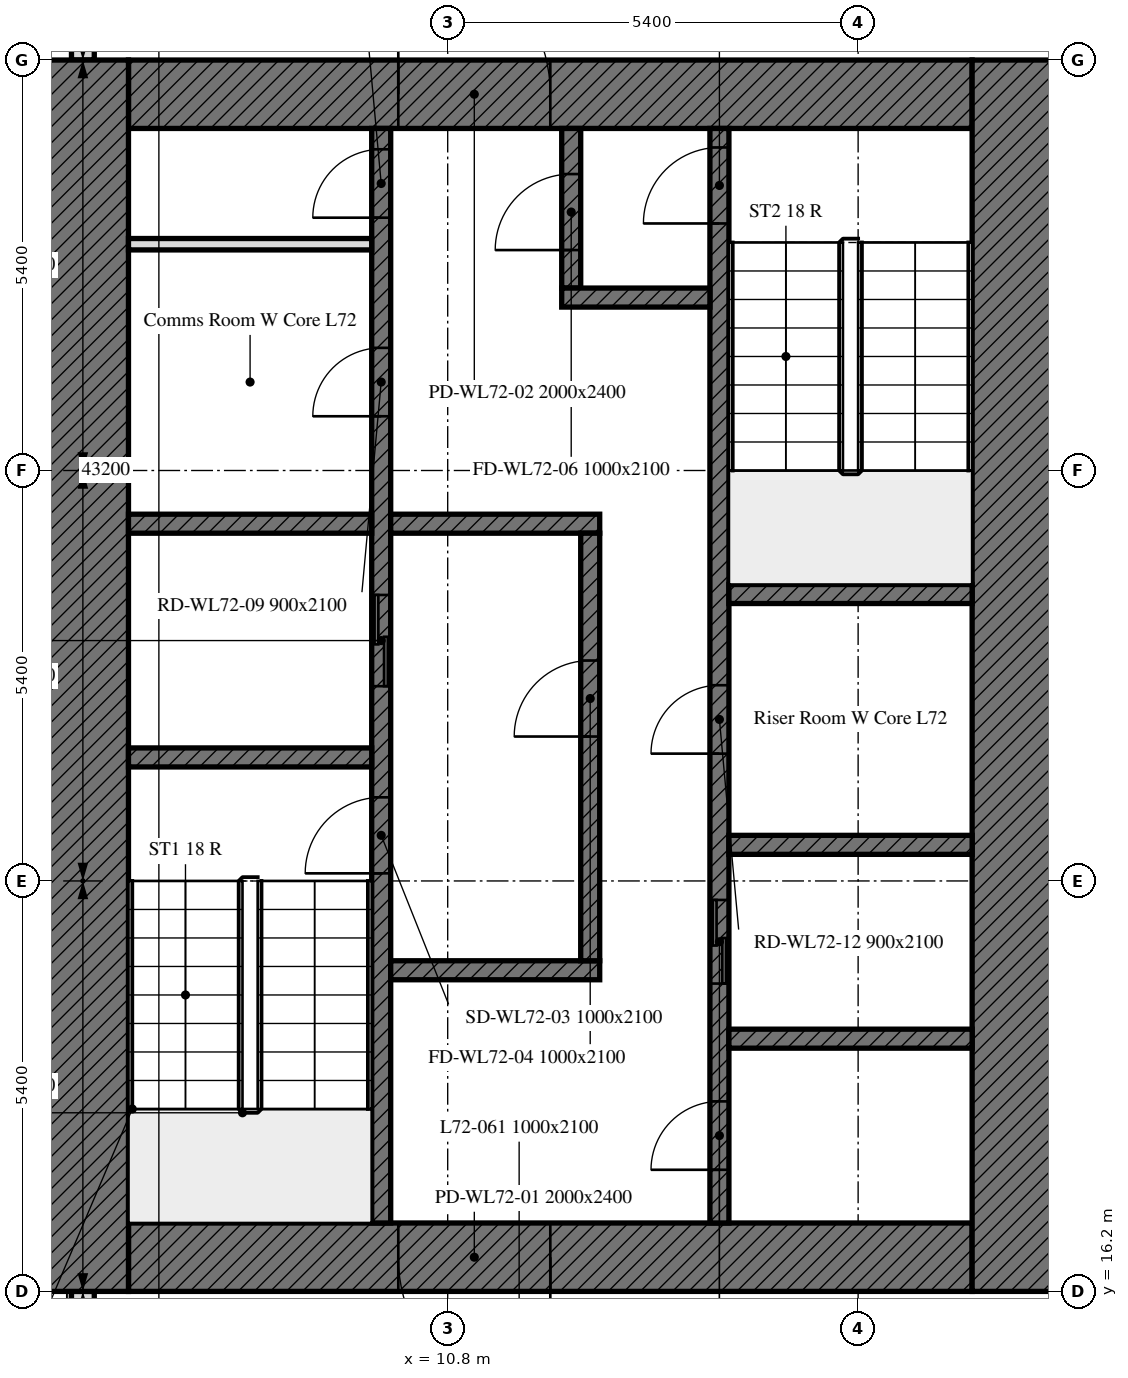
"""IFC4 building model, lengths in metres.
Left out: names, types, materials, properties, quantities, classifications, styles, units other than length and angle.
Written with IfcOpenShell. Run it as: python <this file> out.ifc"""

import sys

from ifc_helpers import new_model, si_unit, direction, frame, frame_2d, origin, place, context, subcontext, project, spatial, rectangle, extrude, element, fill, save


model = new_model("IFC4")
c1 = context("Model", 3, precision=1e-05, world=origin(), true_north=direction((0.0, 1.0)))
c2 = subcontext(c1, "Body", "Model", "MODEL_VIEW")
j1 = project(units=[si_unit("LENGTHUNIT", "METRE"), si_unit("PLANEANGLEUNIT", "RADIAN")], contexts=[c1])
p1 = place(None, origin())
s1 = spatial("IfcSite", under=j1, at=p1, CompositionType="ELEMENT")
p2 = place(p1, origin())
s2 = spatial("IfcBuilding", under=s1, at=p2, CompositionType="ELEMENT")
p3 = place(p2, frame((0.0, 0.0, 291.7)))
s3 = spatial("IfcBuildingStorey", under=s2, at=p3, CompositionType="ELEMENT", Elevation=291.7)
p4 = place(p3, frame((6.0, 43.014, 0.0), z_axis=(0.0, 0.0, 1.0), x_axis=(0.0, -1.0, 0.0)))
e1 = element("IfcWall", 1, at=p4, inside=s3, PredefinedType="SOLIDWALL", context=c2, shape_type="SweptSolid", body=[
    extrude(rectangle(XDim=10.614, YDim=0.3, at=frame_2d((5.307, 0.0))), origin(), (0.0, 0.0, 1.0), 3.0),
])
p5 = place(p4, frame((1.789, 0.0, 0.9)))
e2 = element("IfcOpeningElement", 2, at=p5, cuts=e1, PredefinedType="OPENING", context=c2, shape_type="SweptSolid", body=[
    extrude(rectangle(XDim=0.65, YDim=1.7, at=frame_2d((0.325, 0.85))), frame((0.0, 0.16, 0.0), z_axis=(0.0, -1.0, 0.0), x_axis=(1.0, 0.0, 0.0)), (0.0, 0.0, 1.0), 0.32),
])
p6 = place(p4, frame((2.764, 0.0, 0.9)))
e3 = element("IfcOpeningElement", 3, at=p6, cuts=e1, PredefinedType="OPENING", context=c2, shape_type="SweptSolid", body=[
    extrude(rectangle(XDim=1.1, YDim=1.7, at=frame_2d((0.55, 0.85))), frame((0.0, 0.16, 0.0), z_axis=(0.0, -1.0, 0.0), x_axis=(1.0, 0.0, 0.0)), (0.0, 0.0, 1.0), 0.32),
])
p7 = place(p4, frame((6.564, 0.0, 0.9)))
e4 = element("IfcOpeningElement", 4, at=p7, cuts=e1, PredefinedType="OPENING", context=c2, shape_type="SweptSolid", body=[
    extrude(rectangle(XDim=1.1, YDim=1.7, at=frame_2d((0.55, 0.85))), frame((0.0, 0.16, 0.0), z_axis=(0.0, -1.0, 0.0), x_axis=(1.0, 0.0, 0.0)), (0.0, 0.0, 1.0), 0.32),
])
p8 = place(p4, frame((8.539, 0.0, 0.9)))
e5 = element("IfcOpeningElement", 5, at=p8, cuts=e1, PredefinedType="OPENING", context=c2, shape_type="SweptSolid", body=[
    extrude(rectangle(XDim=0.65, YDim=1.7, at=frame_2d((0.325, 0.85))), frame((0.0, 0.16, 0.0), z_axis=(0.0, -1.0, 0.0), x_axis=(1.0, 0.0, 0.0)), (0.0, 0.0, 1.0), 0.32),
])
p9 = place(p3, frame((6.0, 16.2, 0.0), z_axis=(0.0, 0.0, 1.0), x_axis=(0.0, -1.0, 0.0)))
e6 = element("IfcWall", 6, at=p9, inside=s3, PredefinedType="SOLIDWALL", context=c2, shape_type="SweptSolid", body=[
    extrude(rectangle(XDim=5.214, YDim=0.3, at=frame_2d((2.607, 0.0))), origin(), (0.0, 0.0, 1.0), 3.0),
])
p10 = place(p9, frame((1.0, 0.0, 0.9)))
e7 = element("IfcOpeningElement", 7, at=p10, cuts=e6, PredefinedType="OPENING", context=c2, shape_type="SweptSolid", body=[
    extrude(rectangle(XDim=1.1, YDim=1.7, at=frame_2d((0.55, 0.85))), frame((0.0, 0.16, 0.0), z_axis=(0.0, -1.0, 0.0), x_axis=(1.0, 0.0, 0.0)), (0.0, 0.0, 1.0), 0.32),
])
p11 = place(p9, frame((2.95, 0.0, 0.9)))
e8 = element("IfcOpeningElement", 8, at=p11, cuts=e6, PredefinedType="OPENING", context=c2, shape_type="SweptSolid", body=[
    extrude(rectangle(XDim=1.1, YDim=1.7, at=frame_2d((0.55, 0.85))), frame((0.0, 0.16, 0.0), z_axis=(0.0, -1.0, 0.0), x_axis=(1.0, 0.0, 0.0)), (0.0, 0.0, 1.0), 0.32),
])
p12 = place(p3, frame((17.7, 16.65, 0.0), z_axis=(0.0, 0.0, 1.0), x_axis=(-1.0, 0.0, 0.0)))
e9 = element("IfcWall", 9, at=p12, inside=s3, PredefinedType="SOLIDWALL", context=c2, shape_type="SweptSolid", body=[
    extrude(rectangle(XDim=11.1, YDim=0.9, at=frame_2d((5.55, 0.0))), origin(), (0.0, 0.0, 1.0), 3.0),
])
p13 = place(p12, frame((5.55, 0.0, 0.0)))
e10 = element("IfcOpeningElement", 10, at=p13, cuts=e9, PredefinedType="OPENING", context=c2, shape_type="SweptSolid", body=[
    extrude(rectangle(XDim=2.0, YDim=2.4, at=frame_2d((1.0, 1.2))), frame((0.0, 0.45, 0.0), z_axis=(0.0, -1.0, 0.0), x_axis=(1.0, 0.0, 0.0)), (0.0, 0.0, 1.0), 0.9),
])
p14 = place(p3, frame((6.6, 31.95, 0.0), z_axis=(0.0, 0.0, 1.0), x_axis=(1.0, 0.0, 0.0)))
e11 = element("IfcWall", 11, at=p14, inside=s3, PredefinedType="SOLIDWALL", context=c2, shape_type="SweptSolid", body=[
    extrude(rectangle(XDim=11.1, YDim=0.9, at=frame_2d((5.55, 0.0))), origin(), (0.0, 0.0, 1.0), 3.0),
])
p15 = place(p14, frame((3.55, 0.0, 0.0)))
e12 = element("IfcOpeningElement", 12, at=p15, cuts=e11, PredefinedType="OPENING", context=c2, shape_type="SweptSolid", body=[
    extrude(rectangle(XDim=2.0, YDim=2.4, at=frame_2d((1.0, 1.2))), frame((0.0, 0.45, 0.0), z_axis=(0.0, -1.0, 0.0), x_axis=(1.0, 0.0, 0.0)), (0.0, 0.0, 1.0), 0.9),
])
for number, where, z_axis, x_axis in (
    (13, (6.0, 16.2, 0.0), (0.0, 0.0, 1.0), (0.0, 1.0, 0.0)),
    (14, (18.3, 32.4, 0.0), (0.0, 0.0, 1.0), (0.0, -1.0, 0.0)),
):
    element("IfcWall", number, at=place(p3, frame(where, z_axis=z_axis, x_axis=x_axis)), inside=s3, PredefinedType="SOLIDWALL", context=c2, shape_type="SweptSolid", body=[
        extrude(rectangle(XDim=16.2, YDim=1.2, at=frame_2d((8.1, 0.0))), origin(), (0.0, 0.0, 1.0), 3.0),
    ])
p16 = place(p3, frame((9.925, 17.1, 0.0), z_axis=(0.0, 0.0, 1.0), x_axis=(0.0, 1.0, 0.0)))
e15 = element("IfcWall", 15, at=p16, inside=s3, PredefinedType="SOLIDWALL", context=c2, shape_type="SweptSolid", body=[
    extrude(rectangle(XDim=14.4, YDim=0.25, at=frame_2d((7.2, 0.0))), origin(), (0.0, 0.0, 1.0), 3.0),
])
p17 = place(p16, frame((4.6, 0.0, 0.0)))
e16 = element("IfcOpeningElement", 16, at=p17, cuts=e15, PredefinedType="OPENING", context=c2, shape_type="SweptSolid", body=[
    extrude(rectangle(XDim=1.0, YDim=2.1, at=frame_2d((0.5, 1.05))), frame((0.0, 0.125, 0.0), z_axis=(0.0, -1.0, 0.0), x_axis=(1.0, 0.0, 0.0)), (0.0, 0.0, 1.0), 0.25),
])
p18 = place(p16, frame((7.062, 0.0, 0.0)))
e17 = element("IfcOpeningElement", 17, at=p18, cuts=e15, PredefinedType="OPENING", context=c2, shape_type="SweptSolid", body=[
    extrude(rectangle(XDim=1.2, YDim=2.1, at=frame_2d((0.6, 1.05))), frame((0.0, 0.125, 0.0), z_axis=(0.0, -1.0, 0.0), x_axis=(1.0, 0.0, 0.0)), (0.0, 0.0, 1.0), 0.25),
])
p19 = place(p16, frame((10.614, 0.0, 0.0)))
e18 = element("IfcOpeningElement", 18, at=p19, cuts=e15, PredefinedType="OPENING", context=c2, shape_type="SweptSolid", body=[
    extrude(rectangle(XDim=0.9, YDim=2.1, at=frame_2d((0.45, 1.05))), frame((0.0, 0.125, 0.0), z_axis=(0.0, -1.0, 0.0), x_axis=(1.0, 0.0, 0.0)), (0.0, 0.0, 1.0), 0.25),
])
p20 = place(p16, frame((13.226, 0.0, 0.0)))
e19 = element("IfcOpeningElement", 19, at=p20, cuts=e15, PredefinedType="OPENING", context=c2, shape_type="SweptSolid", body=[
    extrude(rectangle(XDim=0.9, YDim=2.1, at=frame_2d((0.45, 1.05))), frame((0.0, 0.125, 0.0), z_axis=(0.0, -1.0, 0.0), x_axis=(1.0, 0.0, 0.0)), (0.0, 0.0, 1.0), 0.25),
])
p21 = place(p3, frame((14.375, 17.1, 0.0), z_axis=(0.0, 0.0, 1.0), x_axis=(0.0, 1.0, 0.0)))
e20 = element("IfcWall", 20, at=p21, inside=s3, PredefinedType="SOLIDWALL", context=c2, shape_type="SweptSolid", body=[
    extrude(rectangle(XDim=14.4, YDim=0.25, at=frame_2d((7.2, 0.0))), origin(), (0.0, 0.0, 1.0), 3.0),
])
p22 = place(p21, frame((13.15, 0.0, 0.0)))
e21 = element("IfcOpeningElement", 21, at=p22, cuts=e20, PredefinedType="OPENING", context=c2, shape_type="SweptSolid", body=[
    extrude(rectangle(XDim=1.0, YDim=2.1, at=frame_2d((0.5, 1.05))), frame((0.0, 0.125, 0.0), z_axis=(0.0, -1.0, 0.0), x_axis=(1.0, 0.0, 0.0)), (0.0, 0.0, 1.0), 0.25),
])
p23 = place(p21, frame((3.15, 0.0, 0.0)))
e22 = element("IfcOpeningElement", 22, at=p23, cuts=e20, PredefinedType="OPENING", context=c2, shape_type="SweptSolid", body=[
    extrude(rectangle(XDim=1.1, YDim=2.1, at=frame_2d((0.55, 1.05))), frame((0.0, 0.125, 0.0), z_axis=(0.0, -1.0, 0.0), x_axis=(1.0, 0.0, 0.0)), (0.0, 0.0, 1.0), 0.25),
])
p24 = place(p21, frame((0.7, 0.0, 0.0)))
e23 = element("IfcOpeningElement", 23, at=p24, cuts=e20, PredefinedType="OPENING", context=c2, shape_type="SweptSolid", body=[
    extrude(rectangle(XDim=0.9, YDim=2.1, at=frame_2d((0.45, 1.05))), frame((0.0, 0.125, 0.0), z_axis=(0.0, -1.0, 0.0), x_axis=(1.0, 0.0, 0.0)), (0.0, 0.0, 1.0), 0.25),
])
p25 = place(p21, frame((6.175, 0.0, 0.0)))
e24 = element("IfcOpeningElement", 24, at=p25, cuts=e20, PredefinedType="OPENING", context=c2, shape_type="SweptSolid", body=[
    extrude(rectangle(XDim=0.9, YDim=2.1, at=frame_2d((0.45, 1.05))), frame((0.0, 0.125, 0.0), z_axis=(0.0, -1.0, 0.0), x_axis=(1.0, 0.0, 0.0)), (0.0, 0.0, 1.0), 0.25),
])
for number, where, z_axis, x_axis in (
    (25, (6.6, 23.225, 0.0), (0.0, 0.0, 1.0), (1.0, 0.0, 0.0)),
    (26, (14.5, 25.375, 0.0), (0.0, 0.0, 1.0), (1.0, 0.0, 0.0)),
    (27, (14.5, 22.075, 0.0), (0.0, 0.0, 1.0), (1.0, 0.0, 0.0)),
    (28, (6.6, 26.3, 0.0), (0.0, 0.0, 1.0), (1.0, 0.0, 0.0)),
):
    element("IfcWall", number, at=place(p3, frame(where, z_axis=z_axis, x_axis=x_axis)), inside=s3, PredefinedType="SOLIDWALL", context=c2, shape_type="SweptSolid", body=[
        extrude(rectangle(XDim=3.2, YDim=0.25, at=frame_2d((1.6, 0.0))), origin(), (0.0, 0.0, 1.0), 3.0),
    ])
for number, where, z_axis, x_axis in (
    (29, (10.05, 26.3, 0.0), (0.0, 0.0, 1.0), (1.0, 0.0, 0.0)),
    (30, (10.05, 20.425, 0.0), (0.0, 0.0, 1.0), (1.0, 0.0, 0.0)),
):
    element("IfcWall", number, at=place(p3, frame(where, z_axis=z_axis, x_axis=x_axis)), inside=s3, PredefinedType="SOLIDWALL", context=c2, shape_type="SweptSolid", body=[
        extrude(rectangle(XDim=2.75, YDim=0.25, at=frame_2d((1.375, 0.0))), origin(), (0.0, 0.0, 1.0), 3.0),
    ])
p26 = place(p3, frame((12.425, 29.4, 0.0), z_axis=(0.0, 0.0, 1.0), x_axis=(0.0, 1.0, 0.0)))
e31 = element("IfcWall", 31, at=p26, inside=s3, PredefinedType="SOLIDWALL", context=c2, shape_type="SweptSolid", body=[
    extrude(rectangle(XDim=2.1, YDim=0.25, at=frame_2d((1.05, 0.0))), origin(), (0.0, 0.0, 1.0), 3.0),
])
p27 = place(p26, frame((0.5, 0.0, 0.0)))
e32 = element("IfcOpeningElement", 32, at=p27, cuts=e31, PredefinedType="OPENING", context=c2, shape_type="SweptSolid", body=[
    extrude(rectangle(XDim=1.0, YDim=2.1, at=frame_2d((0.5, 1.05))), frame((0.0, 0.125, 0.0), z_axis=(0.0, -1.0, 0.0), x_axis=(1.0, 0.0, 0.0)), (0.0, 0.0, 1.0), 0.25),
])
p28 = place(p3, frame((12.3, 29.275, 0.0), z_axis=(0.0, 0.0, 1.0), x_axis=(1.0, 0.0, 0.0)))
e33 = element("IfcWall", 33, at=p28, inside=s3, PredefinedType="SOLIDWALL", context=c2, shape_type="SweptSolid", body=[
    extrude(rectangle(XDim=1.95, YDim=0.25, at=frame_2d((0.975, 0.0))), origin(), (0.0, 0.0, 1.0), 3.0),
])
p29 = place(p3, frame((12.675, 20.55, 0.0), z_axis=(0.0, 0.0, 1.0), x_axis=(0.0, 1.0, 0.0)))
e34 = element("IfcWall", 34, at=p29, inside=s3, PredefinedType="SOLIDWALL", context=c2, shape_type="SweptSolid", body=[
    extrude(rectangle(XDim=5.625, YDim=0.25, at=frame_2d((2.812, 0.0))), origin(), (0.0, 0.0, 1.0), 3.0),
])
p30 = place(p29, frame((2.95, 0.0, 0.0)))
e35 = element("IfcOpeningElement", 35, at=p30, cuts=e34, PredefinedType="OPENING", context=c2, shape_type="SweptSolid", body=[
    extrude(rectangle(XDim=1.0, YDim=2.1, at=frame_2d((0.5, 1.05))), frame((0.0, 0.125, 0.0), z_axis=(0.0, -1.0, 0.0), x_axis=(1.0, 0.0, 0.0)), (0.0, 0.0, 1.0), 0.25),
])
p31 = place(p3, frame((14.5, 19.525, 0.0), z_axis=(0.0, 0.0, 1.0), x_axis=(1.0, 0.0, 0.0)))
e36 = element("IfcWall", 36, at=p31, inside=s3, PredefinedType="SOLIDWALL", context=c2, shape_type="SweptSolid", body=[
    extrude(rectangle(XDim=3.2, YDim=0.25, at=frame_2d((1.6, 0.0))), origin(), (0.0, 0.0, 1.0), 3.0),
])
p32 = place(p3, frame((6.6, 29.977, 0.0), z_axis=(0.0, 0.0, 1.0), x_axis=(1.0, 0.0, 0.0)))
e37 = element("IfcWall", 37, at=p32, inside=s3, PredefinedType="PARTITIONING", context=c2, shape_type="SweptSolid", body=[
    extrude(rectangle(XDim=3.2, YDim=0.15, at=frame_2d((1.6, 0.0))), origin(), (0.0, 0.0, 1.0), 3.0),
])
p33 = place(p13, origin())
e38 = element("IfcDoor", 38, at=p33, inside=s3, OperationType="DOUBLE_DOOR_SINGLE_SWING", PredefinedType="DOOR", context=c2, shape_type="SweptSolid", body=[
    extrude(rectangle(XDim=2.0, YDim=2.4, at=frame_2d((1.0, 1.2))), frame((0.0, 0.025, 0.0), z_axis=(0.0, -1.0, 0.0), x_axis=(1.0, 0.0, 0.0)), (0.0, 0.0, 1.0), 0.05),
])
fill(e10, e38)
p34 = place(p15, origin())
e39 = element("IfcDoor", 39, at=p34, inside=s3, OperationType="DOUBLE_DOOR_SINGLE_SWING", PredefinedType="DOOR", context=c2, shape_type="SweptSolid", body=[
    extrude(rectangle(XDim=2.0, YDim=2.4, at=frame_2d((1.0, 1.2))), frame((0.0, 0.025, 0.0), z_axis=(0.0, -1.0, 0.0), x_axis=(1.0, 0.0, 0.0)), (0.0, 0.0, 1.0), 0.05),
])
fill(e12, e39)
p35 = place(p17, origin())
e40 = element("IfcDoor", 40, at=p35, inside=s3, OperationType="SINGLE_SWING_LEFT", PredefinedType="DOOR", context=c2, shape_type="SweptSolid", body=[
    extrude(rectangle(XDim=1.0, YDim=2.1, at=frame_2d((0.5, 1.05))), frame((0.0, 0.025, 0.0), z_axis=(0.0, -1.0, 0.0), x_axis=(1.0, 0.0, 0.0)), (0.0, 0.0, 1.0), 0.05),
])
fill(e16, e40)
p36 = place(p30, origin())
e41 = element("IfcDoor", 41, at=p36, inside=s3, OperationType="SINGLE_SWING_LEFT", PredefinedType="DOOR", context=c2, shape_type="SweptSolid", body=[
    extrude(rectangle(XDim=1.0, YDim=2.1, at=frame_2d((0.5, 1.05))), frame((0.0, 0.025, 0.0), z_axis=(0.0, -1.0, 0.0), x_axis=(1.0, 0.0, 0.0)), (0.0, 0.0, 1.0), 0.05),
])
fill(e35, e41)
p37 = place(p22, origin())
e42 = element("IfcDoor", 42, at=p37, inside=s3, OperationType="SINGLE_SWING_LEFT", PredefinedType="DOOR", context=c2, shape_type="SweptSolid", body=[
    extrude(rectangle(XDim=1.0, YDim=2.1, at=frame_2d((0.5, 1.05))), frame((0.0, 0.025, 0.0), z_axis=(0.0, -1.0, 0.0), x_axis=(1.0, 0.0, 0.0)), (0.0, 0.0, 1.0), 0.05),
])
fill(e21, e42)
p38 = place(p27, origin())
e43 = element("IfcDoor", 43, at=p38, inside=s3, OperationType="SINGLE_SWING_LEFT", PredefinedType="DOOR", context=c2, shape_type="SweptSolid", body=[
    extrude(rectangle(XDim=1.0, YDim=2.1, at=frame_2d((0.5, 1.05))), frame((0.0, 0.025, 0.0), z_axis=(0.0, -1.0, 0.0), x_axis=(1.0, 0.0, 0.0)), (0.0, 0.0, 1.0), 0.05),
])
fill(e32, e43)
p39 = place(p18, origin())
e44 = element("IfcDoor", 44, at=p39, inside=s3, OperationType="DOUBLE_DOOR_SLIDING", PredefinedType="DOOR", context=c2, shape_type="SweptSolid", body=[
    extrude(rectangle(XDim=1.2, YDim=2.1, at=frame_2d((0.6, 1.05))), frame((0.0, 0.025, 0.0), z_axis=(0.0, -1.0, 0.0), x_axis=(1.0, 0.0, 0.0)), (0.0, 0.0, 1.0), 0.05),
])
fill(e17, e44)
p40 = place(p23, origin())
e45 = element("IfcDoor", 45, at=p40, inside=s3, OperationType="DOUBLE_DOOR_SLIDING", PredefinedType="DOOR", context=c2, shape_type="SweptSolid", body=[
    extrude(rectangle(XDim=1.1, YDim=2.1, at=frame_2d((0.55, 1.05))), frame((0.0, 0.025, 0.0), z_axis=(0.0, -1.0, 0.0), x_axis=(1.0, 0.0, 0.0)), (0.0, 0.0, 1.0), 0.05),
])
fill(e22, e45)
p41 = place(p19, origin())
e46 = element("IfcDoor", 46, at=p41, inside=s3, OperationType="SINGLE_SWING_LEFT", PredefinedType="DOOR", context=c2, shape_type="SweptSolid", body=[
    extrude(rectangle(XDim=0.9, YDim=2.1, at=frame_2d((0.45, 1.05))), frame((0.0, 0.025, 0.0), z_axis=(0.0, -1.0, 0.0), x_axis=(1.0, 0.0, 0.0)), (0.0, 0.0, 1.0), 0.05),
])
fill(e18, e46)
p42 = place(p20, origin())
e47 = element("IfcDoor", 47, at=p42, inside=s3, OperationType="SINGLE_SWING_LEFT", PredefinedType="DOOR", context=c2, shape_type="SweptSolid", body=[
    extrude(rectangle(XDim=0.9, YDim=2.1, at=frame_2d((0.45, 1.05))), frame((0.0, 0.025, 0.0), z_axis=(0.0, -1.0, 0.0), x_axis=(1.0, 0.0, 0.0)), (0.0, 0.0, 1.0), 0.05),
])
fill(e19, e47)
p43 = place(p24, origin())
e48 = element("IfcDoor", 48, at=p43, inside=s3, OperationType="SINGLE_SWING_LEFT", PredefinedType="DOOR", context=c2, shape_type="SweptSolid", body=[
    extrude(rectangle(XDim=0.9, YDim=2.1, at=frame_2d((0.45, 1.05))), frame((0.0, 0.025, 0.0), z_axis=(0.0, -1.0, 0.0), x_axis=(1.0, 0.0, 0.0)), (0.0, 0.0, 1.0), 0.05),
])
fill(e23, e48)
p44 = place(p25, origin())
e49 = element("IfcDoor", 49, at=p44, inside=s3, OperationType="SINGLE_SWING_LEFT", PredefinedType="DOOR", context=c2, shape_type="SweptSolid", body=[
    extrude(rectangle(XDim=0.9, YDim=2.1, at=frame_2d((0.45, 1.05))), frame((0.0, 0.025, 0.0), z_axis=(0.0, -1.0, 0.0), x_axis=(1.0, 0.0, 0.0)), (0.0, 0.0, 1.0), 0.05),
])
fill(e24, e49)
save(model, sys.argv[1])
